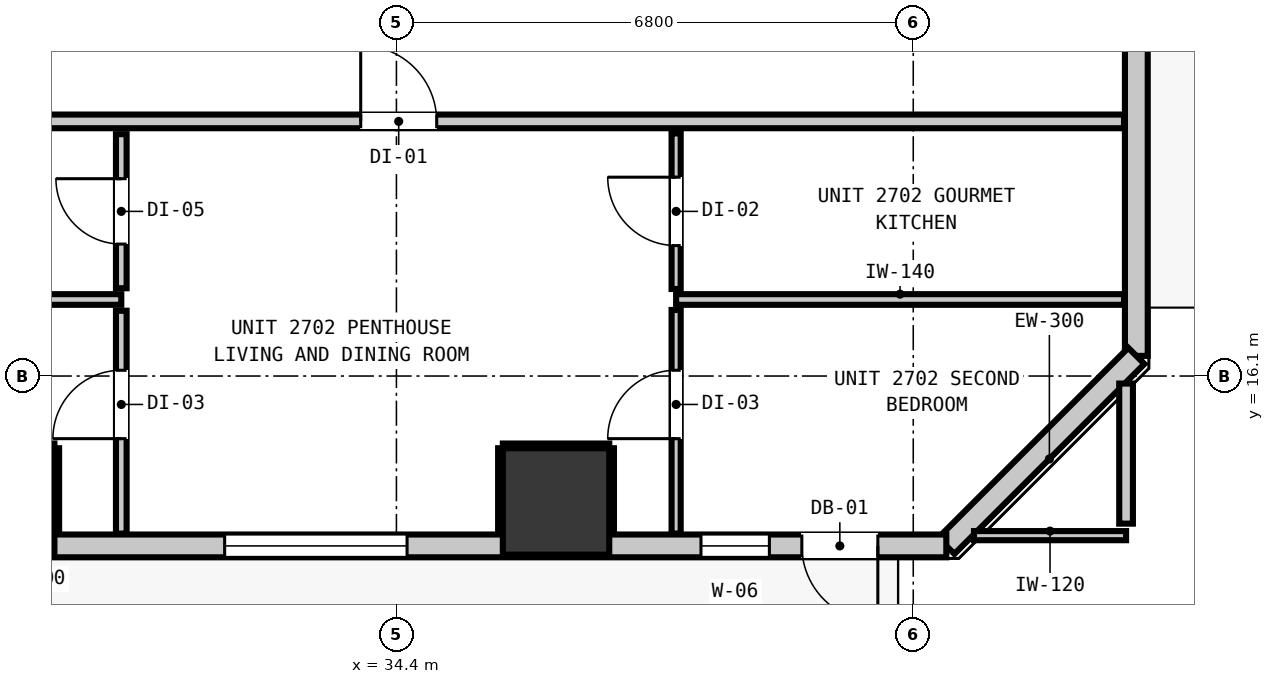
"""IFC4 building model, lengths in metres.
Left out: names, types, materials, properties, quantities, classifications, styles, units other than length and angle.
Written with IfcOpenShell. Run it as: python <this file> out.ifc"""

import sys

from ifc_helpers import new_model, si_unit, direction, frame, frame_2d, origin, origin_2d, place, context, subcontext, project, spatial, rectangle, extrude, element, fill, save


model = new_model("IFC4")
c1 = context("Model", 3, precision=1e-05, world=origin(), true_north=direction((0.0, 1.0)))
c2 = subcontext(c1, "Body", "Model", "MODEL_VIEW")
j1 = project(units=[si_unit("LENGTHUNIT", "METRE"), si_unit("PLANEANGLEUNIT", "RADIAN")], contexts=[c1])
p1 = place(None, origin())
s1 = spatial("IfcSite", under=j1, at=p1, CompositionType="ELEMENT")
p2 = place(p1, origin())
s2 = spatial("IfcBuilding", under=s1, at=p2, CompositionType="ELEMENT")
p3 = place(p2, frame((0.0, 0.0, 96.12)))
s3 = spatial("IfcBuildingStorey", under=s2, at=p3, CompositionType="ELEMENT", Elevation=96.12)
for number, where, z_axis, x_axis in (
    (1, (29.2, 14.45, 0.0), (0.0, 0.0, 1.0), (1.0, 0.0, 0.0)),
    (2, (36.5, 14.45, 0.0), (0.0, 0.0, 1.0), (1.0, 0.0, 0.0)),
):
    element("IfcColumn", number, at=place(p3, frame(where, z_axis=z_axis, x_axis=x_axis)), inside=s3, PredefinedType="COLUMN", context=c2, shape_type="SweptSolid", body=[
        extrude(rectangle(XDim=1.4, YDim=1.4, at=origin_2d()), origin(), (0.0, 0.0, 1.0), 3.32),
    ])
p4 = place(p3, frame((44.135, 51.035, 0.0), z_axis=(0.0, 0.0, 1.0), x_axis=(0.0, -1.0, 0.0)))
e3 = element("IfcWall", 3, at=p4, inside=s3, PredefinedType="STANDARD", context=c2, shape_type="SweptSolid", body=[
    extrude(rectangle(XDim=34.67, YDim=0.3, at=frame_2d((17.335, 0.0))), origin(), (0.0, 0.0, 1.0), 3.06),
])
p5 = place(p4, frame((0.901, 0.0, 0.0)))
e4 = element("IfcOpeningElement", 4, at=p5, cuts=e3, PredefinedType="OPENING", context=c2, shape_type="SweptSolid", body=[
    extrude(rectangle(XDim=1.0, YDim=2.15, at=frame_2d((0.5, 1.075))), frame((0.0, 0.16, 0.0), z_axis=(0.0, -1.0, 0.0), x_axis=(1.0, 0.0, 0.0)), (0.0, 0.0, 1.0), 0.32),
])
p6 = place(p4, frame((3.303, 0.0, 0.85)))
e5 = element("IfcOpeningElement", 5, at=p6, cuts=e3, PredefinedType="OPENING", context=c2, shape_type="SweptSolid", body=[
    extrude(rectangle(XDim=2.4, YDim=1.95, at=frame_2d((1.2, 0.975))), frame((0.0, 0.16, 0.0), z_axis=(0.0, -1.0, 0.0), x_axis=(1.0, 0.0, 0.0)), (0.0, 0.0, 1.0), 0.32),
])
p7 = place(p4, frame((21.61, 0.0, 0.85)))
e6 = element("IfcOpeningElement", 6, at=p7, cuts=e3, PredefinedType="OPENING", context=c2, shape_type="SweptSolid", body=[
    extrude(rectangle(XDim=2.4, YDim=1.95, at=frame_2d((1.2, 0.975))), frame((0.0, 0.16, 0.0), z_axis=(0.0, -1.0, 0.0), x_axis=(1.0, 0.0, 0.0)), (0.0, 0.0, 1.0), 0.32),
])
p8 = place(p3, frame((44.135, 16.365, 0.0), z_axis=(0.0, 0.0, 1.0), x_axis=(-0.707106781187, -0.707106781187, 0.0)))
e7 = element("IfcWall", 7, at=p8, inside=s3, PredefinedType="STANDARD", context=c2, shape_type="SweptSolid", body=[
    extrude(rectangle(XDim=3.536, YDim=0.3, at=frame_2d((1.768, 0.0))), origin(), (0.0, 0.0, 1.0), 3.06),
])
p9 = place(p3, frame((41.635, 13.865, 0.0), z_axis=(0.0, 0.0, 1.0), x_axis=(-1.0, 0.0, 0.0)))
e8 = element("IfcWall", 8, at=p9, inside=s3, PredefinedType="STANDARD", context=c2, shape_type="SweptSolid", body=[
    extrude(rectangle(XDim=37.47, YDim=0.3, at=frame_2d((18.735, 0.0))), origin(), (0.0, 0.0, 1.0), 3.06),
])
p10 = place(p9, frame((0.901, 0.0, 0.0)))
e9 = element("IfcOpeningElement", 9, at=p10, cuts=e8, PredefinedType="OPENING", context=c2, shape_type="SweptSolid", body=[
    extrude(rectangle(XDim=1.0, YDim=2.15, at=frame_2d((0.5, 1.075))), frame((0.0, 0.16, 0.0), z_axis=(0.0, -1.0, 0.0), x_axis=(1.0, 0.0, 0.0)), (0.0, 0.0, 1.0), 0.32),
])
p11 = place(p9, frame((31.179, 0.0, 0.85)))
e10 = element("IfcOpeningElement", 10, at=p11, cuts=e8, PredefinedType="OPENING", context=c2, shape_type="SweptSolid", body=[
    extrude(rectangle(XDim=2.4, YDim=1.95, at=frame_2d((1.2, 0.975))), frame((0.0, 0.16, 0.0), z_axis=(0.0, -1.0, 0.0), x_axis=(1.0, 0.0, 0.0)), (0.0, 0.0, 1.0), 0.32),
])
p12 = place(p9, frame((35.686, 0.0, 0.85)))
e11 = element("IfcOpeningElement", 11, at=p12, cuts=e8, PredefinedType="OPENING", context=c2, shape_type="SweptSolid", body=[
    extrude(rectangle(XDim=1.05, YDim=1.65, at=frame_2d((0.525, 0.825))), frame((0.0, 0.16, 0.0), z_axis=(0.0, -1.0, 0.0), x_axis=(1.0, 0.0, 0.0)), (0.0, 0.0, 1.0), 0.32),
])
p13 = place(p9, frame((24.374, 0.0, 0.85)))
e12 = element("IfcOpeningElement", 12, at=p13, cuts=e8, PredefinedType="OPENING", context=c2, shape_type="SweptSolid", body=[
    extrude(rectangle(XDim=2.4, YDim=1.95, at=frame_2d((1.2, 0.975))), frame((0.0, 0.16, 0.0), z_axis=(0.0, -1.0, 0.0), x_axis=(1.0, 0.0, 0.0)), (0.0, 0.0, 1.0), 0.32),
])
p14 = place(p9, frame((21.95, 0.0, 0.85)))
e13 = element("IfcOpeningElement", 13, at=p14, cuts=e8, PredefinedType="OPENING", context=c2, shape_type="SweptSolid", body=[
    extrude(rectangle(XDim=1.05, YDim=1.65, at=frame_2d((0.525, 0.825))), frame((0.0, 0.16, 0.0), z_axis=(0.0, -1.0, 0.0), x_axis=(1.0, 0.0, 0.0)), (0.0, 0.0, 1.0), 0.32),
])
p15 = place(p9, frame((7.095, 0.0, 0.85)))
e14 = element("IfcOpeningElement", 14, at=p15, cuts=e8, PredefinedType="OPENING", context=c2, shape_type="SweptSolid", body=[
    extrude(rectangle(XDim=2.4, YDim=1.95, at=frame_2d((1.2, 0.975))), frame((0.0, 0.16, 0.0), z_axis=(0.0, -1.0, 0.0), x_axis=(1.0, 0.0, 0.0)), (0.0, 0.0, 1.0), 0.32),
])
p16 = place(p9, frame((14.599, 0.0, 0.85)))
e15 = element("IfcOpeningElement", 15, at=p16, cuts=e8, PredefinedType="OPENING", context=c2, shape_type="SweptSolid", body=[
    extrude(rectangle(XDim=2.4, YDim=1.95, at=frame_2d((1.2, 0.975))), frame((0.0, 0.16, 0.0), z_axis=(0.0, -1.0, 0.0), x_axis=(1.0, 0.0, 0.0)), (0.0, 0.0, 1.0), 0.32),
])
p17 = place(p9, frame((2.328, 0.0, 0.85)))
e16 = element("IfcOpeningElement", 16, at=p17, cuts=e8, PredefinedType="OPENING", context=c2, shape_type="SweptSolid", body=[
    extrude(rectangle(XDim=0.9, YDim=1.5, at=frame_2d((0.45, 0.75))), frame((0.0, 0.16, 0.0), z_axis=(0.0, -1.0, 0.0), x_axis=(1.0, 0.0, 0.0)), (0.0, 0.0, 1.0), 0.32),
])
p18 = place(p3, frame((12.993, 19.45, 0.0), z_axis=(0.0, 0.0, 1.0), x_axis=(1.0, 0.0, 0.0)))
e17 = element("IfcWall", 17, at=p18, inside=s3, PredefinedType="PARTITIONING", context=c2, shape_type="SweptSolid", body=[
    extrude(rectangle(XDim=30.98, YDim=0.18, at=frame_2d((15.49, 0.0))), origin(), (0.0, 0.0, 1.0), 3.06),
])
p19 = place(p18, frame((20.937, 0.0, 0.0)))
e18 = element("IfcOpeningElement", 18, at=p19, cuts=e17, PredefinedType="OPENING", context=c2, shape_type="SweptSolid", body=[
    extrude(rectangle(XDim=1.0, YDim=2.15, at=frame_2d((0.5, 1.075))), frame((0.0, 0.1, 0.0), z_axis=(0.0, -1.0, 0.0), x_axis=(1.0, 0.0, 0.0)), (0.0, 0.0, 1.0), 0.2),
])
p20 = place(p3, frame((11.82, 17.107, 0.0), z_axis=(0.0, 0.0, 1.0), x_axis=(1.0, 0.0, 0.0)))
e19 = element("IfcWall", 19, at=p20, inside=s3, PredefinedType="PARTITIONING", context=c2, shape_type="SweptSolid", body=[
    extrude(rectangle(XDim=18.96, YDim=0.14, at=frame_2d((9.48, 0.0))), origin(), (0.0, 0.0, 1.0), 3.06),
])
p21 = place(p3, frame((38.08, 17.107, 0.0), z_axis=(0.0, 0.0, 1.0), x_axis=(1.0, 0.0, 0.0)))
e20 = element("IfcWall", 20, at=p21, inside=s3, PredefinedType="PARTITIONING", context=c2, shape_type="SweptSolid", body=[
    extrude(rectangle(XDim=5.893, YDim=0.14, at=frame_2d((2.946, 0.0))), origin(), (0.0, 0.0, 1.0), 3.06),
])
p22 = place(p3, frame((41.999, 14.0, 0.0), z_axis=(0.0, 0.0, 1.0), x_axis=(1.0, 0.0, 0.0)))
e21 = element("IfcWall", 21, at=p22, inside=s3, PredefinedType="PARTITIONING", context=c2, shape_type="SweptSolid", body=[
    extrude(rectangle(XDim=2.001, YDim=0.12, at=frame_2d((1.0, 0.0))), origin(), (0.0, 0.0, 1.0), 3.06),
])
p23 = place(p3, frame((44.0, 14.158, 0.0), z_axis=(0.0, 0.0, 1.0), x_axis=(0.0, 1.0, 0.0)))
e22 = element("IfcWall", 22, at=p23, inside=s3, PredefinedType="PARTITIONING", context=c2, shape_type="SweptSolid", body=[
    extrude(rectangle(XDim=1.843, YDim=0.18, at=frame_2d((0.921, 0.0))), origin(), (0.0, 0.0, 1.0), 3.06),
])
p24 = place(p3, frame((30.78, 14.027, 0.0), z_axis=(0.0, 0.0, 1.0), x_axis=(0.0, 1.0, 0.0)))
e23 = element("IfcWall", 23, at=p24, inside=s3, PredefinedType="PARTITIONING", context=c2, shape_type="SweptSolid", body=[
    extrude(rectangle(XDim=2.932, YDim=0.14, at=frame_2d((1.466, 0.0))), origin(), (0.0, 0.0, 1.0), 3.06),
])
p25 = place(p24, frame((1.249, 0.0, 0.0)))
e24 = element("IfcOpeningElement", 24, at=p25, cuts=e23, PredefinedType="OPENING", context=c2, shape_type="SweptSolid", body=[
    extrude(rectangle(XDim=0.9, YDim=2.1, at=frame_2d((0.45, 1.05))), frame((0.0, 0.08, 0.0), z_axis=(0.0, -1.0, 0.0), x_axis=(1.0, 0.0, 0.0)), (0.0, 0.0, 1.0), 0.16),
])
p26 = place(p3, frame((30.78, 17.255, 0.0), z_axis=(0.0, 0.0, 1.0), x_axis=(0.0, 1.0, 0.0)))
e25 = element("IfcWall", 25, at=p26, inside=s3, PredefinedType="PARTITIONING", context=c2, shape_type="SweptSolid", body=[
    extrude(rectangle(XDim=2.027, YDim=0.14, at=frame_2d((1.014, 0.0))), origin(), (0.0, 0.0, 1.0), 3.06),
])
p27 = place(p26, frame((0.581, 0.0, 0.0)))
e26 = element("IfcOpeningElement", 26, at=p27, cuts=e25, PredefinedType="OPENING", context=c2, shape_type="SweptSolid", body=[
    extrude(rectangle(XDim=0.86, YDim=2.02, at=frame_2d((0.43, 1.01))), frame((0.0, 0.08, 0.0), z_axis=(0.0, -1.0, 0.0), x_axis=(1.0, 0.0, 0.0)), (0.0, 0.0, 1.0), 0.16),
])
p28 = place(p3, frame((38.08, 14.027, 0.0), z_axis=(0.0, 0.0, 1.0), x_axis=(0.0, 1.0, 0.0)))
e27 = element("IfcWall", 27, at=p28, inside=s3, PredefinedType="PARTITIONING", context=c2, shape_type="SweptSolid", body=[
    extrude(rectangle(XDim=2.942, YDim=0.12, at=frame_2d((1.471, 0.0))), origin(), (0.0, 0.0, 1.0), 3.06),
])
p29 = place(p28, frame((1.249, 0.0, 0.0)))
e28 = element("IfcOpeningElement", 28, at=p29, cuts=e27, PredefinedType="OPENING", context=c2, shape_type="SweptSolid", body=[
    extrude(rectangle(XDim=0.9, YDim=2.1, at=frame_2d((0.45, 1.05))), frame((0.0, 0.07, 0.0), z_axis=(0.0, -1.0, 0.0), x_axis=(1.0, 0.0, 0.0)), (0.0, 0.0, 1.0), 0.14),
])
p30 = place(p3, frame((38.08, 17.245, 0.0), z_axis=(0.0, 0.0, 1.0), x_axis=(0.0, 1.0, 0.0)))
e29 = element("IfcWall", 29, at=p30, inside=s3, PredefinedType="PARTITIONING", context=c2, shape_type="SweptSolid", body=[
    extrude(rectangle(XDim=2.047, YDim=0.12, at=frame_2d((1.023, 0.0))), origin(), (0.0, 0.0, 1.0), 3.06),
])
p31 = place(p30, frame((0.571, 0.0, 0.0)))
e30 = element("IfcOpeningElement", 30, at=p31, cuts=e29, PredefinedType="OPENING", context=c2, shape_type="SweptSolid", body=[
    extrude(rectangle(XDim=0.9, YDim=2.1, at=frame_2d((0.45, 1.05))), frame((0.0, 0.07, 0.0), z_axis=(0.0, -1.0, 0.0), x_axis=(1.0, 0.0, 0.0)), (0.0, 0.0, 1.0), 0.14),
])
p32 = place(p3, frame((28.5, 15.182, 0.0), z_axis=(0.0, 0.0, 1.0), x_axis=(1.0, 0.0, 0.0)))
e31 = element("IfcWall", 31, at=p32, inside=s3, PredefinedType="PARTITIONING", context=c2, shape_type="SweptSolid", body=[
    extrude(rectangle(XDim=1.4, YDim=0.06, at=frame_2d((0.7, 0.0))), origin(), (0.0, 0.0, 1.0), 1.45),
])
p33 = place(p3, frame((29.932, 14.03, 0.0), z_axis=(0.0, 0.0, 1.0), x_axis=(0.0, 1.0, 0.0)))
e32 = element("IfcWall", 32, at=p33, inside=s3, PredefinedType="PARTITIONING", context=c2, shape_type="SweptSolid", body=[
    extrude(rectangle(XDim=1.12, YDim=0.06, at=frame_2d((0.56, 0.0))), origin(), (0.0, 0.0, 1.0), 1.45),
])
p34 = place(p3, frame((35.8, 15.182, 0.0), z_axis=(0.0, 0.0, 1.0), x_axis=(1.0, 0.0, 0.0)))
e33 = element("IfcWall", 33, at=p34, inside=s3, PredefinedType="PARTITIONING", context=c2, shape_type="SweptSolid", body=[
    extrude(rectangle(XDim=1.4, YDim=0.06, at=frame_2d((0.7, 0.0))), origin(), (0.0, 0.0, 1.0), 1.45),
])
for number, where, z_axis, x_axis in (
    (34, (35.768, 14.03, 0.0), (0.0, 0.0, 1.0), (0.0, 1.0, 0.0)),
    (35, (37.232, 14.03, 0.0), (0.0, 0.0, 1.0), (0.0, 1.0, 0.0)),
):
    element("IfcWall", number, at=place(p3, frame(where, z_axis=z_axis, x_axis=x_axis)), inside=s3, PredefinedType="PARTITIONING", context=c2, shape_type="SweptSolid", body=[
        extrude(rectangle(XDim=1.12, YDim=0.06, at=frame_2d((0.56, 0.0))), origin(), (0.0, 0.0, 1.0), 1.45),
    ])
p35 = place(p10, origin())
e36 = element("IfcDoor", 36, at=p35, inside=s3, OperationType="SINGLE_SWING_LEFT", PredefinedType="DOOR", context=c2, shape_type="SweptSolid", body=[
    extrude(rectangle(XDim=1.0, YDim=2.15, at=frame_2d((0.5, 1.075))), frame((0.0, 0.025, 0.0), z_axis=(0.0, -1.0, 0.0), x_axis=(1.0, 0.0, 0.0)), (0.0, 0.0, 1.0), 0.05),
])
fill(e9, e36)
p36 = place(p15, origin())
e37 = element("IfcWindow", 37, at=p36, inside=s3, PartitioningType="SINGLE_PANEL", PredefinedType="WINDOW", context=c2, shape_type="SweptSolid", body=[
    extrude(rectangle(XDim=2.4, YDim=1.95, at=frame_2d((1.2, 0.975))), frame((0.0, 0.03, 0.0), z_axis=(0.0, -1.0, 0.0), x_axis=(1.0, 0.0, 0.0)), (0.0, 0.0, 1.0), 0.06),
])
fill(e14, e37)
p37 = place(p17, origin())
e38 = element("IfcWindow", 38, at=p37, inside=s3, PartitioningType="SINGLE_PANEL", PredefinedType="WINDOW", context=c2, shape_type="SweptSolid", body=[
    extrude(rectangle(XDim=0.9, YDim=1.5, at=frame_2d((0.45, 0.75))), frame((0.0, 0.03, 0.0), z_axis=(0.0, -1.0, 0.0), x_axis=(1.0, 0.0, 0.0)), (0.0, 0.0, 1.0), 0.06),
])
fill(e16, e38)
p38 = place(p19, origin())
e39 = element("IfcDoor", 39, at=p38, inside=s3, OperationType="SINGLE_SWING_LEFT", PredefinedType="DOOR", context=c2, shape_type="SweptSolid", body=[
    extrude(rectangle(XDim=1.0, YDim=2.15, at=frame_2d((0.5, 1.075))), frame((0.0, 0.025, 0.0), z_axis=(0.0, -1.0, 0.0), x_axis=(1.0, 0.0, 0.0)), (0.0, 0.0, 1.0), 0.05),
])
fill(e18, e39)
p39 = place(p27, origin())
e40 = element("IfcDoor", 40, at=p39, inside=s3, OperationType="SINGLE_SWING_RIGHT", PredefinedType="DOOR", context=c2, shape_type="SweptSolid", body=[
    extrude(rectangle(XDim=0.86, YDim=2.02, at=frame_2d((0.43, 1.01))), frame((0.0, 0.025, 0.0), z_axis=(0.0, -1.0, 0.0), x_axis=(1.0, 0.0, 0.0)), (0.0, 0.0, 1.0), 0.05),
])
fill(e26, e40)
p40 = place(p25, origin())
e41 = element("IfcDoor", 41, at=p40, inside=s3, OperationType="SINGLE_SWING_LEFT", PredefinedType="DOOR", context=c2, shape_type="SweptSolid", body=[
    extrude(rectangle(XDim=0.9, YDim=2.1, at=frame_2d((0.45, 1.05))), frame((0.0, 0.025, 0.0), z_axis=(0.0, -1.0, 0.0), x_axis=(1.0, 0.0, 0.0)), (0.0, 0.0, 1.0), 0.05),
])
fill(e24, e41)
p41 = place(p31, origin())
e42 = element("IfcDoor", 42, at=p41, inside=s3, OperationType="SINGLE_SWING_RIGHT", PredefinedType="DOOR", context=c2, shape_type="SweptSolid", body=[
    extrude(rectangle(XDim=0.9, YDim=2.1, at=frame_2d((0.45, 1.05))), frame((0.0, 0.025, 0.0), z_axis=(0.0, -1.0, 0.0), x_axis=(1.0, 0.0, 0.0)), (0.0, 0.0, 1.0), 0.05),
])
fill(e30, e42)
p42 = place(p29, origin())
e43 = element("IfcDoor", 43, at=p42, inside=s3, OperationType="SINGLE_SWING_LEFT", PredefinedType="DOOR", context=c2, shape_type="SweptSolid", body=[
    extrude(rectangle(XDim=0.9, YDim=2.1, at=frame_2d((0.45, 1.05))), frame((0.0, 0.025, 0.0), z_axis=(0.0, -1.0, 0.0), x_axis=(1.0, 0.0, 0.0)), (0.0, 0.0, 1.0), 0.05),
])
fill(e28, e43)
save(model, sys.argv[1])
